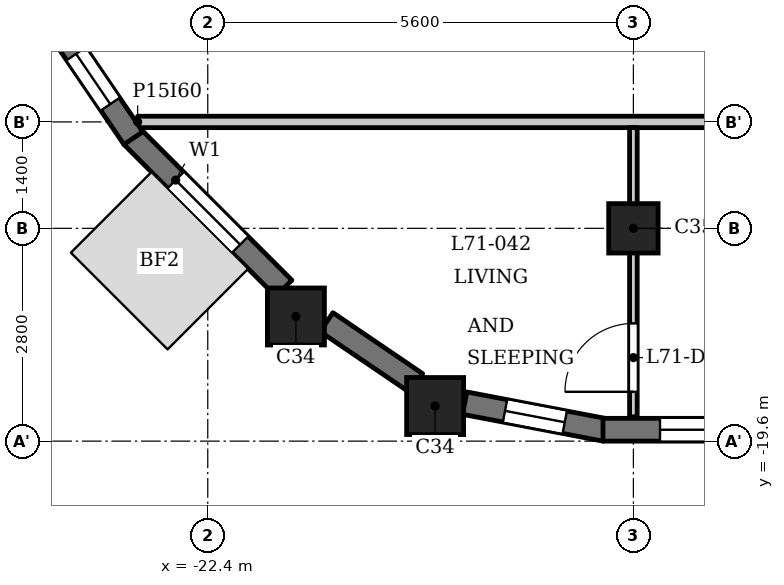
"""IFC4 building model, lengths in metres.
Left out: names, types, materials, properties, quantities, classifications, styles, units other than length and angle.
Written with IfcOpenShell. Run it as: python <this file> out.ifc"""

import sys

from ifc_helpers import new_model, si_unit, direction, frame, frame_2d, origin, origin_2d, place, context, subcontext, project, spatial, rectangle, extrude, element, fill, save


model = new_model("IFC4")
c1 = context("Model", 3, precision=1e-05, world=origin(), true_north=direction((0.0, 1.0)))
c2 = subcontext(c1, "Body", "Model", "MODEL_VIEW")
j1 = project(units=[si_unit("LENGTHUNIT", "METRE"), si_unit("PLANEANGLEUNIT", "RADIAN")], contexts=[c1])
p1 = place(None, origin())
s1 = spatial("IfcSite", under=j1, at=p1, CompositionType="ELEMENT")
p2 = place(p1, origin())
s2 = spatial("IfcBuilding", under=s1, at=p2, CompositionType="ELEMENT")
p3 = place(p2, frame((0.0, 0.0, 273.2)))
s3 = spatial("IfcBuildingStorey", under=s2, at=p3, CompositionType="ELEMENT", Elevation=273.2)
for number, where, z_axis, x_axis in (
    (1, (-19.409, -19.138, 0.0), (0.0, 0.0, 1.0), (1.0, 0.0, 0.0)),
    (2, (-21.24, -17.96, 0.0), (0.0, 0.0, 1.0), (1.0, 0.0, 0.0)),
):
    element("IfcColumn", number, at=place(p3, frame(where, z_axis=z_axis, x_axis=x_axis)), inside=s3, PredefinedType="COLUMN", context=c2, shape_type="SweptSolid", body=[
        extrude(rectangle(XDim=0.75, YDim=0.75, at=origin_2d()), origin(), (0.0, 0.0, 1.0), 3.5),
    ])
p4 = place(p3, frame((-16.8, -16.8, 0.0), z_axis=(0.0, 0.0, 1.0), x_axis=(1.0, 0.0, 0.0)))
e3 = element("IfcColumn", 3, at=p4, inside=s3, PredefinedType="COLUMN", context=c2, shape_type="SweptSolid", body=[
    extrude(rectangle(XDim=0.65, YDim=0.65, at=origin_2d()), origin(), (0.0, 0.0, 1.0), 3.5),
])
p5 = place(p3, frame((-23.397, -15.591, 0.0), z_axis=(0.0, 0.0, 1.0), x_axis=(0.707106781187, -0.707106781187, 0.0)))
e4 = element("IfcWall", 4, at=p5, inside=s3, PredefinedType="SOLIDWALL", context=c2, shape_type="SweptSolid", body=[
    extrude(rectangle(XDim=2.825, YDim=0.3, at=frame_2d((1.413, 0.0))), origin(), (0.0, 0.0, 1.0), 2.55),
])
p6 = place(p5, frame((0.812, 0.0, 0.6)))
e5 = element("IfcOpeningElement", 5, at=p6, cuts=e4, PredefinedType="OPENING", context=c2, shape_type="SweptSolid", body=[
    extrude(rectangle(XDim=1.2, YDim=1.55, at=frame_2d((0.6, 0.775))), frame((0.0, 0.16, 0.0), z_axis=(0.0, -1.0, 0.0), x_axis=(1.0, 0.0, 0.0)), (0.0, 0.0, 1.0), 0.32),
])
p7 = place(p3, frame((-20.837, -18.034, 0.0), z_axis=(0.0, 0.0, 1.0), x_axis=(0.827095130818, -0.562061957952, 0.0)))
e6 = element("IfcWall", 6, at=p7, inside=s3, PredefinedType="SOLIDWALL", context=c2, shape_type="SweptSolid", body=[
    extrude(rectangle(XDim=1.427, YDim=0.3, at=frame_2d((0.713, 0.0))), origin(), (0.0, 0.0, 1.0), 2.55),
])
p8 = place(p3, frame((-19.02, -19.1, 0.0), z_axis=(0.0, 0.0, 1.0), x_axis=(0.982284001233, -0.187398348234, 0.0)))
e7 = element("IfcWall", 7, at=p8, inside=s3, PredefinedType="SOLIDWALL", context=c2, shape_type="SweptSolid", body=[
    extrude(rectangle(XDim=1.881, YDim=0.3, at=frame_2d((0.941, 0.0))), origin(), (0.0, 0.0, 1.0), 2.55),
])
p9 = place(p8, frame((0.541, 0.0, 0.6)))
e8 = element("IfcOpeningElement", 8, at=p9, cuts=e7, PredefinedType="OPENING", context=c2, shape_type="SweptSolid", body=[
    extrude(rectangle(XDim=0.8, YDim=1.55, at=frame_2d((0.4, 0.775))), frame((0.0, 0.16, 0.0), z_axis=(0.0, -1.0, 0.0), x_axis=(1.0, 0.0, 0.0)), (0.0, 0.0, 1.0), 0.32),
])
p10 = place(p3, frame((-17.2, -19.45, 0.0), z_axis=(0.0, 0.0, 1.0), x_axis=(1.0, 0.0, 0.0)))
e9 = element("IfcWall", 9, at=p10, inside=s3, PredefinedType="SOLIDWALL", context=c2, shape_type="SweptSolid", body=[
    extrude(rectangle(XDim=2.825, YDim=0.3, at=frame_2d((1.413, 0.0))), origin(), (0.0, 0.0, 1.0), 2.55),
])
p11 = place(p10, frame((0.75, 0.0, 0.9)))
e10 = element("IfcOpeningElement", 10, at=p11, cuts=e9, PredefinedType="OPENING", context=c2, shape_type="SweptSolid", body=[
    extrude(rectangle(XDim=1.8, YDim=1.25, at=frame_2d((0.9, 0.625))), frame((0.0, 0.16, 0.0), z_axis=(0.0, -1.0, 0.0), x_axis=(1.0, 0.0, 0.0)), (0.0, 0.0, 1.0), 0.32),
])
p12 = place(p3, frame((-24.436, -14.057, 0.0), z_axis=(0.0, 0.0, 1.0), x_axis=(0.562075713892, -0.827085782645, 0.0)))
e11 = element("IfcWall", 11, at=p12, inside=s3, PredefinedType="SOLIDWALL", context=c2, shape_type="SweptSolid", body=[
    extrude(rectangle(XDim=1.881, YDim=0.3, at=frame_2d((0.94, 0.0))), origin(), (0.0, 0.0, 1.0), 2.55),
])
p13 = place(p12, frame((0.541, 0.0, 0.6)))
e12 = element("IfcOpeningElement", 12, at=p13, cuts=e11, PredefinedType="OPENING", context=c2, shape_type="SweptSolid", body=[
    extrude(rectangle(XDim=0.8, YDim=1.55, at=frame_2d((0.4, 0.775))), frame((0.0, 0.16, 0.0), z_axis=(0.0, -1.0, 0.0), x_axis=(1.0, 0.0, 0.0)), (0.0, 0.0, 1.0), 0.32),
])
p14 = place(p3, frame((-23.322, -15.4, 0.0), z_axis=(0.0, 0.0, 1.0), x_axis=(1.0, 0.0, 0.0)))
e13 = element("IfcWall", 13, at=p14, inside=s3, PredefinedType="PARTITIONING", context=c2, shape_type="SweptSolid", body=[
    extrude(rectangle(XDim=46.872, YDim=0.15, at=frame_2d((23.436, 0.0))), origin(), (0.0, 0.0, 1.0), 3.2),
])
p15 = place(p14, frame((8.172, 0.0, 0.0)))
e14 = element("IfcOpeningElement", 14, at=p15, cuts=e13, PredefinedType="OPENING", context=c2, shape_type="SweptSolid", body=[
    extrude(rectangle(XDim=1.0, YDim=2.1, at=frame_2d((0.5, 1.05))), frame((0.0, 0.085, 0.0), z_axis=(0.0, -1.0, 0.0), x_axis=(1.0, 0.0, 0.0)), (0.0, 0.0, 1.0), 0.17),
])
p16 = place(p14, frame((15.172, 0.0, 0.0)))
e15 = element("IfcOpeningElement", 15, at=p16, cuts=e13, PredefinedType="OPENING", context=c2, shape_type="SweptSolid", body=[
    extrude(rectangle(XDim=1.0, YDim=2.1, at=frame_2d((0.5, 1.05))), frame((0.0, 0.085, 0.0), z_axis=(0.0, -1.0, 0.0), x_axis=(1.0, 0.0, 0.0)), (0.0, 0.0, 1.0), 0.17),
])
p17 = place(p14, frame((31.972, 0.0, 0.0)))
e16 = element("IfcOpeningElement", 16, at=p17, cuts=e13, PredefinedType="OPENING", context=c2, shape_type="SweptSolid", body=[
    extrude(rectangle(XDim=1.0, YDim=2.1, at=frame_2d((0.5, 1.05))), frame((0.0, 0.085, 0.0), z_axis=(0.0, -1.0, 0.0), x_axis=(1.0, 0.0, 0.0)), (0.0, 0.0, 1.0), 0.17),
])
p18 = place(p3, frame((-16.8, -19.28, 0.0), z_axis=(0.0, 0.0, 1.0), x_axis=(0.0, 1.0, 0.0)))
e17 = element("IfcWall", 17, at=p18, inside=s3, PredefinedType="PARTITIONING", context=c2, shape_type="SweptSolid", body=[
    extrude(rectangle(XDim=3.805, YDim=0.1, at=frame_2d((1.902, 0.0))), origin(), (0.0, 0.0, 1.0), 3.2),
])
p19 = place(p18, frame((0.329, 0.0, 0.0)))
e18 = element("IfcOpeningElement", 18, at=p19, cuts=e17, PredefinedType="OPENING", context=c2, shape_type="SweptSolid", body=[
    extrude(rectangle(XDim=0.9, YDim=2.1, at=frame_2d((0.45, 1.05))), frame((0.0, 0.06, 0.0), z_axis=(0.0, -1.0, 0.0), x_axis=(1.0, 0.0, 0.0)), (0.0, 0.0, 1.0), 0.12),
])
p20 = place(p19, origin())
e19 = element("IfcDoor", 19, at=p20, inside=s3, OperationType="SINGLE_SWING_RIGHT", PredefinedType="DOOR", context=c2, shape_type="SweptSolid", body=[
    extrude(rectangle(XDim=0.9, YDim=2.1, at=frame_2d((0.45, 1.05))), frame((0.0, 0.025, 0.0), z_axis=(0.0, -1.0, 0.0), x_axis=(1.0, 0.0, 0.0)), (0.0, 0.0, 1.0), 0.05),
])
fill(e18, e19)
p21 = place(p6, origin())
e20 = element("IfcWindow", 20, at=p21, inside=s3, PartitioningType="SINGLE_PANEL", PredefinedType="WINDOW", context=c2, shape_type="SweptSolid", body=[
    extrude(rectangle(XDim=1.2, YDim=1.55, at=frame_2d((0.6, 0.775))), frame((0.0, 0.03, 0.0), z_axis=(0.0, -1.0, 0.0), x_axis=(1.0, 0.0, 0.0)), (0.0, 0.0, 1.0), 0.06),
])
fill(e5, e20)
p22 = place(p9, origin())
e21 = element("IfcWindow", 21, at=p22, inside=s3, PartitioningType="SINGLE_PANEL", PredefinedType="WINDOW", context=c2, shape_type="SweptSolid", body=[
    extrude(rectangle(XDim=0.8, YDim=1.55, at=frame_2d((0.4, 0.775))), frame((0.0, 0.03, 0.0), z_axis=(0.0, -1.0, 0.0), x_axis=(1.0, 0.0, 0.0)), (0.0, 0.0, 1.0), 0.06),
])
fill(e8, e21)
p23 = place(p11, origin())
e22 = element("IfcWindow", 22, at=p23, inside=s3, PartitioningType="SINGLE_PANEL", PredefinedType="WINDOW", context=c2, shape_type="SweptSolid", body=[
    extrude(rectangle(XDim=1.8, YDim=1.25, at=frame_2d((0.9, 0.625))), frame((0.0, 0.03, 0.0), z_axis=(0.0, -1.0, 0.0), x_axis=(1.0, 0.0, 0.0)), (0.0, 0.0, 1.0), 0.06),
])
fill(e10, e22)
p24 = place(p13, origin())
e23 = element("IfcWindow", 23, at=p24, inside=s3, PartitioningType="SINGLE_PANEL", PredefinedType="WINDOW", context=c2, shape_type="SweptSolid", body=[
    extrude(rectangle(XDim=0.8, YDim=1.55, at=frame_2d((0.4, 0.775))), frame((0.0, 0.03, 0.0), z_axis=(0.0, -1.0, 0.0), x_axis=(1.0, 0.0, 0.0)), (0.0, 0.0, 1.0), 0.06),
])
fill(e12, e23)
save(model, sys.argv[1])
